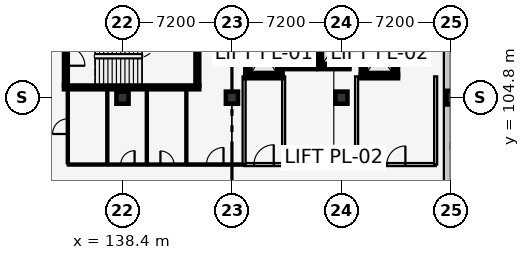
"""IFC4 building model, lengths in metres.
Left out: names, types, materials, properties, quantities, classifications, styles, units other than length and angle.
Written with IfcOpenShell. Run it as: python <this file> out.ifc"""

import sys

from ifc_helpers import new_model, si_unit, direction, frame, frame_2d, origin, origin_2d, place, context, subcontext, project, spatial, rectangle, extrude, element, fill, save


model = new_model("IFC4")
c1 = context("Model", 3, precision=1e-05, world=origin(), true_north=direction((0.0, 1.0)))
c2 = subcontext(c1, "Body", "Model", "MODEL_VIEW")
j1 = project(units=[si_unit("LENGTHUNIT", "METRE"), si_unit("PLANEANGLEUNIT", "RADIAN")], contexts=[c1])
p1 = place(None, origin())
s1 = spatial("IfcSite", under=j1, at=p1, CompositionType="ELEMENT")
p2 = place(p1, origin())
s2 = spatial("IfcBuilding", under=s1, at=p2, CompositionType="ELEMENT")
p3 = place(p2, frame((0.0, 0.0, 5.4)))
s3 = spatial("IfcBuildingStorey", under=s2, at=p3, CompositionType="ELEMENT", Elevation=5.4)
for number, where, z_axis, x_axis in (
    (1, (138.4, 104.8, 0.0), (0.0, 0.0, 1.0), (1.0, 0.0, 0.0)),
    (2, (145.6, 104.8, 0.0), (0.0, 0.0, 1.0), (1.0, 0.0, 0.0)),
    (3, (152.8, 104.8, 0.0), (0.0, 0.0, 1.0), (1.0, 0.0, 0.0)),
):
    element("IfcColumn", number, at=place(p3, frame(where, z_axis=z_axis, x_axis=x_axis)), inside=s3, PredefinedType="COLUMN", context=c2, shape_type="SweptSolid", body=[
        extrude(rectangle(XDim=0.8, YDim=0.8, at=origin_2d()), origin(), (0.0, 0.0, 1.0), 4.2),
    ])
p4 = place(p3, frame((160.0, 104.8, 0.0), z_axis=(0.0, 0.0, 1.0), x_axis=(1.0, 0.0, 0.0)))
e4 = element("IfcColumn", 4, at=p4, inside=s3, PredefinedType="COLUMN", context=c2, shape_type="SweptSolid", body=[
    extrude(rectangle(XDim=0.6, YDim=0.9, at=origin_2d()), origin(), (0.0, 0.0, 1.0), 4.2),
])
p5 = place(p3, frame((159.77, 112.0, 0.0), z_axis=(0.0, 0.0, 1.0), x_axis=(0.0, -1.0, 0.0)))
e5 = element("IfcWall", 5, at=p5, inside=s3, PredefinedType="SOLIDWALL", context=c2, shape_type="SweptSolid", body=[
    extrude(rectangle(XDim=28.8, YDim=0.46, at=frame_2d((14.4, 0.0))), origin(), (0.0, 0.0, 1.0), 3.205),
])
p6 = place(p3, frame((134.55, 105.475, 0.0), z_axis=(0.0, 0.0, 1.0), x_axis=(1.0, 0.0, 0.0)))
e6 = element("IfcWall", 6, at=p6, inside=s3, PredefinedType="SHEAR", context=c2, shape_type="SweptSolid", body=[
    extrude(rectangle(XDim=8.9, YDim=0.25, at=frame_2d((4.45, 0.0))), origin(), (0.0, 0.0, 1.0), 3.95),
])
p7 = place(p3, frame((134.675, 109.45, 0.0), z_axis=(0.0, 0.0, 1.0), x_axis=(0.0, -1.0, 0.0)))
e7 = element("IfcWall", 7, at=p7, inside=s3, PredefinedType="SHEAR", context=c2, shape_type="SweptSolid", body=[
    extrude(rectangle(XDim=3.85, YDim=0.25, at=frame_2d((1.925, 0.0))), origin(), (0.0, 0.0, 1.0), 3.95),
])
p8 = place(p7, frame((1.3, 0.0, 0.0)))
e8 = element("IfcOpeningElement", 8, at=p8, cuts=e7, PredefinedType="OPENING", context=c2, shape_type="SweptSolid", body=[
    extrude(rectangle(XDim=1.25, YDim=2.15, at=frame_2d((0.625, 1.075))), frame((0.0, 0.137, 0.0), z_axis=(0.0, -1.0, 0.0), x_axis=(1.0, 0.0, 0.0)), (0.0, 0.0, 1.0), 0.274),
])
p9 = place(p3, frame((143.325, 105.6, 0.0), z_axis=(0.0, 0.0, 1.0), x_axis=(0.0, 1.0, 0.0)))
e9 = element("IfcWall", 9, at=p9, inside=s3, PredefinedType="SHEAR", context=c2, shape_type="SweptSolid", body=[
    extrude(rectangle(XDim=3.85, YDim=0.25, at=frame_2d((1.925, 0.0))), origin(), (0.0, 0.0, 1.0), 3.95),
])
p10 = place(p3, frame((146.475, 106.2, 0.0), z_axis=(0.0, 0.0, 1.0), x_axis=(1.0, 0.0, 0.0)))
e10 = element("IfcWall", 10, at=p10, inside=s3, PredefinedType="SHEAR", context=c2, shape_type="SweptSolid", body=[
    extrude(rectangle(XDim=2.45, YDim=0.25, at=frame_2d((1.225, 0.0))), origin(), (0.0, 0.0, 1.0), 3.95),
])
p11 = place(p10, frame((0.675, 0.0, 0.0)))
e11 = element("IfcOpeningElement", 11, at=p11, cuts=e10, PredefinedType="OPENING", context=c2, shape_type="SweptSolid", body=[
    extrude(rectangle(XDim=1.1, YDim=2.15, at=frame_2d((0.55, 1.075))), frame((0.0, 0.137, 0.0), z_axis=(0.0, -1.0, 0.0), x_axis=(1.0, 0.0, 0.0)), (0.0, 0.0, 1.0), 0.274),
])
for number, where, z_axis, x_axis in (
    (12, (146.6, 109.2, 0.0), (0.0, 0.0, 1.0), (0.0, -1.0, 0.0)),
    (13, (148.8, 106.2, 0.0), (0.0, 0.0, 1.0), (0.0, 1.0, 0.0)),
):
    element("IfcWall", number, at=place(p3, frame(where, z_axis=z_axis, x_axis=x_axis)), inside=s3, PredefinedType="SHEAR", context=c2, shape_type="SweptSolid", body=[
        extrude(rectangle(XDim=3.0, YDim=0.25, at=frame_2d((1.5, 0.0))), origin(), (0.0, 0.0, 1.0), 3.95),
    ])
p12 = place(p3, frame((146.4, 100.4, 0.0), z_axis=(0.0, 0.0, 1.0), x_axis=(1.0, 0.0, 0.0)))
e14 = element("IfcWall", 14, at=p12, inside=s3, PredefinedType="PARTITIONING", context=c2, shape_type="SweptSolid", body=[
    extrude(rectangle(XDim=2.6, YDim=0.2, at=frame_2d((1.3, 0.0))), origin(), (0.0, 0.0, 1.0), 3.95),
])
p13 = place(p12, frame((0.65, 0.0, 0.0)))
e15 = element("IfcOpeningElement", 15, at=p13, cuts=e14, PredefinedType="OPENING", context=c2, shape_type="SweptSolid", body=[
    extrude(rectangle(XDim=1.3, YDim=2.2, at=frame_2d((0.65, 1.1))), frame((0.0, 0.112, 0.0), z_axis=(0.0, -1.0, 0.0), x_axis=(1.0, 0.0, 0.0)), (0.0, 0.0, 1.0), 0.224),
])
p14 = place(p3, frame((146.4, 106.2, 0.0), z_axis=(0.0, 0.0, 1.0), x_axis=(0.0, -1.0, 0.0)))
e16 = element("IfcWall", 16, at=p14, inside=s3, PredefinedType="PARTITIONING", context=c2, shape_type="SweptSolid", body=[
    extrude(rectangle(XDim=5.8, YDim=0.2, at=frame_2d((2.9, 0.0))), origin(), (0.0, 0.0, 1.0), 3.95),
])
p15 = place(p3, frame((149.0, 100.4, 0.0), z_axis=(0.0, 0.0, 1.0), x_axis=(0.0, 1.0, 0.0)))
e17 = element("IfcWall", 17, at=p15, inside=s3, PredefinedType="PARTITIONING", context=c2, shape_type="SweptSolid", body=[
    extrude(rectangle(XDim=5.8, YDim=0.2, at=frame_2d((2.9, 0.0))), origin(), (0.0, 0.0, 1.0), 3.375),
])
p16 = place(p3, frame((154.075, 106.2, 0.0), z_axis=(0.0, 0.0, 1.0), x_axis=(1.0, 0.0, 0.0)))
e18 = element("IfcWall", 18, at=p16, inside=s3, PredefinedType="SHEAR", context=c2, shape_type="SweptSolid", body=[
    extrude(rectangle(XDim=2.45, YDim=0.25, at=frame_2d((1.225, 0.0))), origin(), (0.0, 0.0, 1.0), 3.95),
])
p17 = place(p16, frame((0.675, 0.0, 0.0)))
e19 = element("IfcOpeningElement", 19, at=p17, cuts=e18, PredefinedType="OPENING", context=c2, shape_type="SweptSolid", body=[
    extrude(rectangle(XDim=1.1, YDim=2.15, at=frame_2d((0.55, 1.075))), frame((0.0, 0.137, 0.0), z_axis=(0.0, -1.0, 0.0), x_axis=(1.0, 0.0, 0.0)), (0.0, 0.0, 1.0), 0.274),
])
for number, where, z_axis, x_axis in (
    (20, (154.2, 109.2, 0.0), (0.0, 0.0, 1.0), (0.0, -1.0, 0.0)),
    (21, (156.4, 106.2, 0.0), (0.0, 0.0, 1.0), (0.0, 1.0, 0.0)),
):
    element("IfcWall", number, at=place(p3, frame(where, z_axis=z_axis, x_axis=x_axis)), inside=s3, PredefinedType="SHEAR", context=c2, shape_type="SweptSolid", body=[
        extrude(rectangle(XDim=3.0, YDim=0.25, at=frame_2d((1.5, 0.0))), origin(), (0.0, 0.0, 1.0), 3.95),
    ])
p18 = place(p3, frame((153.8, 100.4, 0.0), z_axis=(0.0, 0.0, 1.0), x_axis=(1.0, 0.0, 0.0)))
e22 = element("IfcWall", 22, at=p18, inside=s3, PredefinedType="PARTITIONING", context=c2, shape_type="SweptSolid", body=[
    extrude(rectangle(XDim=5.2, YDim=0.2, at=frame_2d((2.6, 0.0))), origin(), (0.0, 0.0, 1.0), 3.95),
])
p19 = place(p18, frame((1.99, 0.0, 0.0)))
e23 = element("IfcOpeningElement", 23, at=p19, cuts=e22, PredefinedType="OPENING", context=c2, shape_type="SweptSolid", body=[
    extrude(rectangle(XDim=1.22, YDim=2.2, at=frame_2d((0.61, 1.1))), frame((0.0, 0.112, 0.0), z_axis=(0.0, -1.0, 0.0), x_axis=(1.0, 0.0, 0.0)), (0.0, 0.0, 1.0), 0.224),
])
for number, where, z_axis, x_axis in (
    (24, (153.8, 106.2, 0.0), (0.0, 0.0, 1.0), (0.0, -1.0, 0.0)),
    (25, (159.0, 100.4, 0.0), (0.0, 0.0, 1.0), (0.0, 1.0, 0.0)),
):
    element("IfcWall", number, at=place(p3, frame(where, z_axis=z_axis, x_axis=x_axis)), inside=s3, PredefinedType="PARTITIONING", context=c2, shape_type="SweptSolid", body=[
        extrude(rectangle(XDim=5.8, YDim=0.2, at=frame_2d((2.9, 0.0))), origin(), (0.0, 0.0, 1.0), 3.95),
    ])
p20 = place(p3, frame((149.075, 106.8, 0.0), z_axis=(0.0, 0.0, 1.0), x_axis=(1.0, 0.0, 0.0)))
e26 = element("IfcWall", 26, at=p20, inside=s3, PredefinedType="SHEAR", context=c2, shape_type="SweptSolid", body=[
    extrude(rectangle(XDim=2.05, YDim=0.25, at=frame_2d((1.025, 0.0))), origin(), (0.0, 0.0, 1.0), 3.95),
])
p21 = place(p20, frame((0.525, 0.0, 0.0)))
e27 = element("IfcOpeningElement", 27, at=p21, cuts=e26, PredefinedType="OPENING", context=c2, shape_type="SweptSolid", body=[
    extrude(rectangle(XDim=1.0, YDim=2.15, at=frame_2d((0.5, 1.075))), frame((0.0, 0.137, 0.0), z_axis=(0.0, -1.0, 0.0), x_axis=(1.0, 0.0, 0.0)), (0.0, 0.0, 1.0), 0.274),
])
for number, where, z_axis, x_axis in (
    (28, (149.2, 109.4, 0.0), (0.0, 0.0, 1.0), (0.0, -1.0, 0.0)),
    (29, (151.0, 106.8, 0.0), (0.0, 0.0, 1.0), (0.0, 1.0, 0.0)),
):
    element("IfcWall", number, at=place(p3, frame(where, z_axis=z_axis, x_axis=x_axis)), inside=s3, PredefinedType="SHEAR", context=c2, shape_type="SweptSolid", body=[
        extrude(rectangle(XDim=2.6, YDim=0.25, at=frame_2d((1.3, 0.0))), origin(), (0.0, 0.0, 1.0), 3.95),
    ])
p22 = place(p3, frame((151.275, 106.8, 0.0), z_axis=(0.0, 0.0, 1.0), x_axis=(1.0, 0.0, 0.0)))
e30 = element("IfcWall", 30, at=p22, inside=s3, PredefinedType="SHEAR", context=c2, shape_type="SweptSolid", body=[
    extrude(rectangle(XDim=2.05, YDim=0.25, at=frame_2d((1.025, 0.0))), origin(), (0.0, 0.0, 1.0), 3.95),
])
p23 = place(p22, frame((0.525, 0.0, 0.0)))
e31 = element("IfcOpeningElement", 31, at=p23, cuts=e30, PredefinedType="OPENING", context=c2, shape_type="SweptSolid", body=[
    extrude(rectangle(XDim=1.0, YDim=2.15, at=frame_2d((0.5, 1.075))), frame((0.0, 0.137, 0.0), z_axis=(0.0, -1.0, 0.0), x_axis=(1.0, 0.0, 0.0)), (0.0, 0.0, 1.0), 0.274),
])
for number, where, z_axis, x_axis in (
    (32, (151.4, 109.4, 0.0), (0.0, 0.0, 1.0), (0.0, -1.0, 0.0)),
    (33, (153.2, 106.8, 0.0), (0.0, 0.0, 1.0), (0.0, 1.0, 0.0)),
):
    element("IfcWall", number, at=place(p3, frame(where, z_axis=z_axis, x_axis=x_axis)), inside=s3, PredefinedType="SHEAR", context=c2, shape_type="SweptSolid", body=[
        extrude(rectangle(XDim=2.6, YDim=0.25, at=frame_2d((1.3, 0.0))), origin(), (0.0, 0.0, 1.0), 3.95),
    ])
p24 = place(p3, frame((134.8, 100.4, 0.0), z_axis=(0.0, 0.0, 1.0), x_axis=(1.0, 0.0, 0.0)))
e34 = element("IfcWall", 34, at=p24, inside=s3, PredefinedType="PARTITIONING", context=c2, shape_type="SweptSolid", body=[
    extrude(rectangle(XDim=2.6, YDim=0.14, at=frame_2d((1.3, 0.0))), origin(), (0.0, 0.0, 1.0), 3.95),
])
p25 = place(p3, frame((134.8, 100.48, 0.0), z_axis=(0.0, 0.0, 1.0), x_axis=(0.0, 1.0, 0.0)))
e35 = element("IfcWall", 35, at=p25, inside=s3, PredefinedType="PARTITIONING", context=c2, shape_type="SweptSolid", body=[
    extrude(rectangle(XDim=4.86, YDim=0.14, at=frame_2d((2.43, 0.0))), origin(), (0.0, 0.0, 1.0), 3.595),
])
p26 = place(p25, frame((1.93, 0.0, 0.0)))
e36 = element("IfcOpeningElement", 36, at=p26, cuts=e35, PredefinedType="OPENING", context=c2, shape_type="SweptSolid", body=[
    extrude(rectangle(XDim=1.0, YDim=2.1, at=frame_2d((0.5, 1.05))), frame((0.0, 0.082, 0.0), z_axis=(0.0, -1.0, 0.0), x_axis=(1.0, 0.0, 0.0)), (0.0, 0.0, 1.0), 0.164),
])
p27 = place(p3, frame((137.4, 100.48, 0.0), z_axis=(0.0, 0.0, 1.0), x_axis=(0.0, 1.0, 0.0)))
e37 = element("IfcWall", 37, at=p27, inside=s3, PredefinedType="PARTITIONING", context=c2, shape_type="SweptSolid", body=[
    extrude(rectangle(XDim=4.86, YDim=0.14, at=frame_2d((2.43, 0.0))), origin(), (0.0, 0.0, 1.0), 3.95),
])
p28 = place(p3, frame((137.48, 100.4, 0.0), z_axis=(0.0, 0.0, 1.0), x_axis=(1.0, 0.0, 0.0)))
e38 = element("IfcWall", 38, at=p28, inside=s3, PredefinedType="PARTITIONING", context=c2, shape_type="SweptSolid", body=[
    extrude(rectangle(XDim=2.52, YDim=0.14, at=frame_2d((1.26, 0.0))), origin(), (0.0, 0.0, 1.0), 3.95),
])
p29 = place(p28, frame((0.805, 0.0, 0.0)))
e39 = element("IfcOpeningElement", 39, at=p29, cuts=e38, PredefinedType="OPENING", context=c2, shape_type="SweptSolid", body=[
    extrude(rectangle(XDim=0.91, YDim=2.06, at=frame_2d((0.455, 1.03))), frame((0.0, 0.082, 0.0), z_axis=(0.0, -1.0, 0.0), x_axis=(1.0, 0.0, 0.0)), (0.0, 0.0, 1.0), 0.164),
])
p30 = place(p3, frame((140.0, 100.48, 0.0), z_axis=(0.0, 0.0, 1.0), x_axis=(0.0, 1.0, 0.0)))
e40 = element("IfcWall", 40, at=p30, inside=s3, PredefinedType="PARTITIONING", context=c2, shape_type="SweptSolid", body=[
    extrude(rectangle(XDim=4.86, YDim=0.14, at=frame_2d((2.43, 0.0))), origin(), (0.0, 0.0, 1.0), 3.95),
])
p31 = place(p3, frame((140.08, 100.4, 0.0), z_axis=(0.0, 0.0, 1.0), x_axis=(1.0, 0.0, 0.0)))
e41 = element("IfcWall", 41, at=p31, inside=s3, PredefinedType="PARTITIONING", context=c2, shape_type="SweptSolid", body=[
    extrude(rectangle(XDim=2.52, YDim=0.14, at=frame_2d((1.26, 0.0))), origin(), (0.0, 0.0, 1.0), 3.95),
])
p32 = place(p31, frame((0.815, 0.0, 0.0)))
e42 = element("IfcOpeningElement", 42, at=p32, cuts=e41, PredefinedType="OPENING", context=c2, shape_type="SweptSolid", body=[
    extrude(rectangle(XDim=0.89, YDim=2.05, at=frame_2d((0.445, 1.025))), frame((0.0, 0.082, 0.0), z_axis=(0.0, -1.0, 0.0), x_axis=(1.0, 0.0, 0.0)), (0.0, 0.0, 1.0), 0.164),
])
p33 = place(p3, frame((142.6, 100.48, 0.0), z_axis=(0.0, 0.0, 1.0), x_axis=(0.0, 1.0, 0.0)))
e43 = element("IfcWall", 43, at=p33, inside=s3, PredefinedType="PARTITIONING", context=c2, shape_type="SweptSolid", body=[
    extrude(rectangle(XDim=4.86, YDim=0.14, at=frame_2d((2.43, 0.0))), origin(), (0.0, 0.0, 1.0), 3.95),
])
p34 = place(p3, frame((142.68, 100.4, 0.0), z_axis=(0.0, 0.0, 1.0), x_axis=(1.0, 0.0, 0.0)))
e44 = element("IfcWall", 44, at=p34, inside=s3, PredefinedType="PARTITIONING", context=c2, shape_type="SweptSolid", body=[
    extrude(rectangle(XDim=3.61, YDim=0.15, at=frame_2d((1.805, 0.0))), origin(), (0.0, 0.0, 1.0), 3.95),
])
p35 = place(p34, frame((1.245, 0.0, 0.0)))
e45 = element("IfcOpeningElement", 45, at=p35, cuts=e44, PredefinedType="OPENING", context=c2, shape_type="SweptSolid", body=[
    extrude(rectangle(XDim=1.12, YDim=2.15, at=frame_2d((0.56, 1.075))), frame((0.0, 0.087, 0.0), z_axis=(0.0, -1.0, 0.0), x_axis=(1.0, 0.0, 0.0)), (0.0, 0.0, 1.0), 0.174),
])
p36 = place(p8, origin())
e46 = element("IfcDoor", 46, at=p36, inside=s3, OperationType="SINGLE_SWING_RIGHT", PredefinedType="DOOR", context=c2, shape_type="SweptSolid", body=[
    extrude(rectangle(XDim=1.25, YDim=2.15, at=frame_2d((0.625, 1.075))), frame((0.0, 0.025, 0.0), z_axis=(0.0, -1.0, 0.0), x_axis=(1.0, 0.0, 0.0)), (0.0, 0.0, 1.0), 0.05),
])
fill(e8, e46)
p37 = place(p11, origin())
e47 = element("IfcDoor", 47, at=p37, inside=s3, OperationType="SLIDING_TO_LEFT", PredefinedType="DOOR", context=c2, shape_type="SweptSolid", body=[
    extrude(rectangle(XDim=1.1, YDim=2.15, at=frame_2d((0.55, 1.075))), frame((0.0, 0.025, 0.0), z_axis=(0.0, -1.0, 0.0), x_axis=(1.0, 0.0, 0.0)), (0.0, 0.0, 1.0), 0.05),
])
fill(e11, e47)
p38 = place(p13, origin())
e48 = element("IfcDoor", 48, at=p38, inside=s3, OperationType="SINGLE_SWING_RIGHT", PredefinedType="DOOR", context=c2, shape_type="SweptSolid", body=[
    extrude(rectangle(XDim=1.3, YDim=2.2, at=frame_2d((0.65, 1.1))), frame((0.0, 0.025, 0.0), z_axis=(0.0, -1.0, 0.0), x_axis=(1.0, 0.0, 0.0)), (0.0, 0.0, 1.0), 0.05),
])
fill(e15, e48)
p39 = place(p17, origin())
e49 = element("IfcDoor", 49, at=p39, inside=s3, OperationType="SLIDING_TO_LEFT", PredefinedType="DOOR", context=c2, shape_type="SweptSolid", body=[
    extrude(rectangle(XDim=1.1, YDim=2.15, at=frame_2d((0.55, 1.075))), frame((0.0, 0.025, 0.0), z_axis=(0.0, -1.0, 0.0), x_axis=(1.0, 0.0, 0.0)), (0.0, 0.0, 1.0), 0.05),
])
fill(e19, e49)
p40 = place(p19, origin())
e50 = element("IfcDoor", 50, at=p40, inside=s3, OperationType="SINGLE_SWING_RIGHT", PredefinedType="DOOR", context=c2, shape_type="SweptSolid", body=[
    extrude(rectangle(XDim=1.22, YDim=2.2, at=frame_2d((0.61, 1.1))), frame((0.0, 0.025, 0.0), z_axis=(0.0, -1.0, 0.0), x_axis=(1.0, 0.0, 0.0)), (0.0, 0.0, 1.0), 0.05),
])
fill(e23, e50)
p41 = place(p21, origin())
e51 = element("IfcDoor", 51, at=p41, inside=s3, OperationType="SLIDING_TO_LEFT", PredefinedType="DOOR", context=c2, shape_type="SweptSolid", body=[
    extrude(rectangle(XDim=1.0, YDim=2.15, at=frame_2d((0.5, 1.075))), frame((0.0, 0.025, 0.0), z_axis=(0.0, -1.0, 0.0), x_axis=(1.0, 0.0, 0.0)), (0.0, 0.0, 1.0), 0.05),
])
fill(e27, e51)
p42 = place(p23, origin())
e52 = element("IfcDoor", 52, at=p42, inside=s3, OperationType="SLIDING_TO_LEFT", PredefinedType="DOOR", context=c2, shape_type="SweptSolid", body=[
    extrude(rectangle(XDim=1.0, YDim=2.15, at=frame_2d((0.5, 1.075))), frame((0.0, 0.025, 0.0), z_axis=(0.0, -1.0, 0.0), x_axis=(1.0, 0.0, 0.0)), (0.0, 0.0, 1.0), 0.05),
])
fill(e31, e52)
p43 = place(p26, origin())
e53 = element("IfcDoor", 53, at=p43, inside=s3, OperationType="SINGLE_SWING_LEFT", PredefinedType="DOOR", context=c2, shape_type="SweptSolid", body=[
    extrude(rectangle(XDim=1.0, YDim=2.1, at=frame_2d((0.5, 1.05))), frame((0.0, 0.025, 0.0), z_axis=(0.0, -1.0, 0.0), x_axis=(1.0, 0.0, 0.0)), (0.0, 0.0, 1.0), 0.05),
])
fill(e36, e53)
p44 = place(p29, origin())
e54 = element("IfcDoor", 54, at=p44, inside=s3, OperationType="SINGLE_SWING_RIGHT", PredefinedType="DOOR", context=c2, shape_type="SweptSolid", body=[
    extrude(rectangle(XDim=0.91, YDim=2.06, at=frame_2d((0.455, 1.03))), frame((0.0, 0.025, 0.0), z_axis=(0.0, -1.0, 0.0), x_axis=(1.0, 0.0, 0.0)), (0.0, 0.0, 1.0), 0.05),
])
fill(e39, e54)
p45 = place(p32, origin())
e55 = element("IfcDoor", 55, at=p45, inside=s3, OperationType="SINGLE_SWING_LEFT", PredefinedType="DOOR", context=c2, shape_type="SweptSolid", body=[
    extrude(rectangle(XDim=0.89, YDim=2.05, at=frame_2d((0.445, 1.025))), frame((0.0, 0.025, 0.0), z_axis=(0.0, -1.0, 0.0), x_axis=(1.0, 0.0, 0.0)), (0.0, 0.0, 1.0), 0.05),
])
fill(e42, e55)
p46 = place(p35, origin())
e56 = element("IfcDoor", 56, at=p46, inside=s3, OperationType="SINGLE_SWING_RIGHT", PredefinedType="DOOR", context=c2, shape_type="SweptSolid", body=[
    extrude(rectangle(XDim=1.12, YDim=2.15, at=frame_2d((0.56, 1.075))), frame((0.0, 0.025, 0.0), z_axis=(0.0, -1.0, 0.0), x_axis=(1.0, 0.0, 0.0)), (0.0, 0.0, 1.0), 0.05),
])
fill(e45, e56)
save(model, sys.argv[1])
